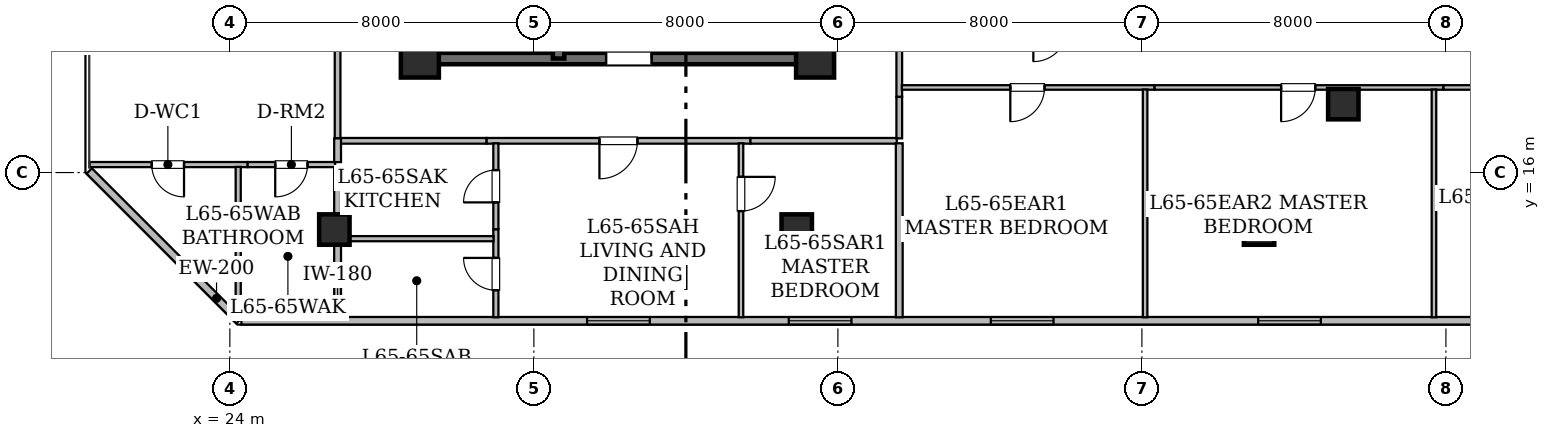
"""IFC4 building model, lengths in metres.
Left out: names, types, materials, properties, quantities, classifications, styles, units other than length and angle.
Written with IfcOpenShell. Run it as: python <this file> out.ifc"""

import sys

from ifc_helpers import new_model, si_unit, direction, frame, frame_2d, origin, origin_2d, place, context, subcontext, project, spatial, rectangle, hollow_rectangle, extrude, element, fill, save


model = new_model("IFC4")
c1 = context("Model", 3, precision=1e-05, world=origin(), true_north=direction((0.0, 1.0)))
c2 = subcontext(c1, "Body", "Model", "MODEL_VIEW")
j1 = project(units=[si_unit("LENGTHUNIT", "METRE"), si_unit("PLANEANGLEUNIT", "RADIAN")], contexts=[c1])
p1 = place(None, origin())
s1 = spatial("IfcSite", under=j1, at=p1, CompositionType="ELEMENT")
p2 = place(p1, origin())
s2 = spatial("IfcBuilding", under=s1, at=p2, CompositionType="ELEMENT")
p3 = place(p2, frame((0.0, 0.0, 253.7)))
s3 = spatial("IfcBuildingStorey", under=s2, at=p3, CompositionType="ELEMENT", Elevation=253.7)
for number, where, z_axis, x_axis in (
    (1, (29.0, 19.0, 0.0), (0.0, 0.0, 1.0), (1.0, 0.0, 0.0)),
    (2, (39.4, 19.0, 0.0), (0.0, 0.0, 1.0), (1.0, 0.0, 0.0)),
):
    element("IfcColumn", number, at=place(p3, frame(where, z_axis=z_axis, x_axis=x_axis)), inside=s3, PredefinedType="COLUMN", context=c2, shape_type="SweptSolid", body=[
        extrude(hollow_rectangle(XDim=1.0, YDim=1.0, WallThickness=0.05, at=origin_2d()), origin(), (0.0, 0.0, 1.0), 3.65),
    ])
for number, where, z_axis, x_axis in (
    (3, (26.75, 14.5, 0.0), (0.0, 0.0, 1.0), (1.0, 0.0, 0.0)),
    (4, (38.917, 14.5, 0.0), (0.0, 0.0, 1.0), (1.0, 0.0, 0.0)),
    (5, (51.083, 14.5, 0.0), (0.0, 0.0, 1.0), (1.0, 0.0, 0.0)),
    (6, (53.3, 17.8, 0.0), (0.0, 0.0, 1.0), (1.0, 0.0, 0.0)),
):
    element("IfcColumn", number, at=place(p3, frame(where, z_axis=z_axis, x_axis=x_axis)), inside=s3, PredefinedType="COLUMN", context=c2, shape_type="SweptSolid", body=[
        extrude(hollow_rectangle(XDim=0.8, YDim=0.8, WallThickness=0.04, at=origin_2d()), origin(), (0.0, 0.0, 1.0), 3.65),
    ])
p4 = place(p3, frame((24.241, 12.1, 0.0), z_axis=(0.0, 0.0, 1.0), x_axis=(-0.707106781187, 0.707106781187, 0.0)))
e7 = element("IfcWall", 7, at=p4, inside=s3, PredefinedType="STANDARD", context=c2, shape_type="SweptSolid", body=[
    extrude(rectangle(XDim=5.573, YDim=0.2, at=frame_2d((2.787, 0.0))), origin(), (0.0, 0.0, 1.0), 3.43),
])
p5 = place(p3, frame((65.696, 12.1, 0.0), z_axis=(0.0, 0.0, 1.0), x_axis=(-1.0, 0.0, 0.0)))
e8 = element("IfcWall", 8, at=p5, inside=s3, PredefinedType="STANDARD", context=c2, shape_type="SweptSolid", body=[
    extrude(rectangle(XDim=41.393, YDim=0.2, at=frame_2d((20.697, 0.0))), origin(), (0.0, 0.0, 1.0), 3.43),
])
p6 = place(p5, frame((30.646, 0.0, 0.85)))
e9 = element("IfcOpeningElement", 9, at=p6, cuts=e8, PredefinedType="OPENING", context=c2, shape_type="SweptSolid", body=[
    extrude(rectangle(XDim=1.65, YDim=1.55, at=frame_2d((0.825, 0.775))), frame((0.0, 0.11, 0.0), z_axis=(0.0, -1.0, 0.0), x_axis=(1.0, 0.0, 0.0)), (0.0, 0.0, 1.0), 0.22),
])
p7 = place(p5, frame((25.339, 0.0, 0.85)))
e10 = element("IfcOpeningElement", 10, at=p7, cuts=e8, PredefinedType="OPENING", context=c2, shape_type="SweptSolid", body=[
    extrude(rectangle(XDim=1.65, YDim=1.55, at=frame_2d((0.825, 0.775))), frame((0.0, 0.11, 0.0), z_axis=(0.0, -1.0, 0.0), x_axis=(1.0, 0.0, 0.0)), (0.0, 0.0, 1.0), 0.22),
])
p8 = place(p5, frame((20.022, 0.0, 0.85)))
e11 = element("IfcOpeningElement", 11, at=p8, cuts=e8, PredefinedType="OPENING", context=c2, shape_type="SweptSolid", body=[
    extrude(rectangle(XDim=1.65, YDim=1.55, at=frame_2d((0.825, 0.775))), frame((0.0, 0.11, 0.0), z_axis=(0.0, -1.0, 0.0), x_axis=(1.0, 0.0, 0.0)), (0.0, 0.0, 1.0), 0.22),
])
p9 = place(p5, frame((12.987, 0.0, 0.85)))
e12 = element("IfcOpeningElement", 12, at=p9, cuts=e8, PredefinedType="OPENING", context=c2, shape_type="SweptSolid", body=[
    extrude(rectangle(XDim=1.65, YDim=1.55, at=frame_2d((0.825, 0.775))), frame((0.0, 0.11, 0.0), z_axis=(0.0, -1.0, 0.0), x_axis=(1.0, 0.0, 0.0)), (0.0, 0.0, 1.0), 0.22),
])
p10 = place(p5, frame((4.787, 0.0, 0.85)))
e13 = element("IfcOpeningElement", 13, at=p10, cuts=e8, PredefinedType="OPENING", context=c2, shape_type="SweptSolid", body=[
    extrude(rectangle(XDim=1.65, YDim=1.55, at=frame_2d((0.825, 0.775))), frame((0.0, 0.11, 0.0), z_axis=(0.0, -1.0, 0.0), x_axis=(1.0, 0.0, 0.0)), (0.0, 0.0, 1.0), 0.22),
])
p11 = place(p3, frame((29.0, 19.0, 0.0), z_axis=(0.0, 0.0, 1.0), x_axis=(0.0, 1.0, 0.0)))
e14 = element("IfcWall", 14, at=p11, inside=s3, PredefinedType="SHEAR", context=c2, shape_type="SweptSolid", body=[
    extrude(rectangle(XDim=9.0, YDim=0.3, at=frame_2d((4.5, 0.0))), origin(), (0.0, 0.0, 1.0), 3.43),
])
p12 = place(p3, frame((29.0, 19.0, 0.0), z_axis=(0.0, 0.0, 1.0), x_axis=(1.0, 0.0, 0.0)))
e15 = element("IfcWall", 15, at=p12, inside=s3, PredefinedType="SHEAR", context=c2, shape_type="SweptSolid", body=[
    extrude(rectangle(XDim=10.4, YDim=0.3, at=frame_2d((5.2, 0.0))), origin(), (0.0, 0.0, 1.0), 3.43),
])
p13 = place(p12, frame((4.9, 0.0, 0.0)))
e16 = element("IfcOpeningElement", 16, at=p13, cuts=e15, PredefinedType="OPENING", context=c2, shape_type="SweptSolid", body=[
    extrude(rectangle(XDim=1.2, YDim=2.15, at=frame_2d((0.6, 1.075))), frame((0.0, 0.16, 0.0), z_axis=(0.0, -1.0, 0.0), x_axis=(1.0, 0.0, 0.0)), (0.0, 0.0, 1.0), 0.32),
])
p14 = place(p3, frame((39.4, 19.0, 0.0), z_axis=(0.0, 0.0, 1.0), x_axis=(0.0, 1.0, 0.0)))
e17 = element("IfcWall", 17, at=p14, inside=s3, PredefinedType="SHEAR", context=c2, shape_type="SweptSolid", body=[
    extrude(rectangle(XDim=5.4, YDim=0.3, at=frame_2d((2.7, 0.0))), origin(), (0.0, 0.0, 1.0), 3.43),
])
p15 = place(p3, frame((32.65, 19.0, 0.0), z_axis=(0.0, 0.0, 1.0), x_axis=(0.0, 1.0, 0.0)))
e18 = element("IfcWall", 18, at=p15, inside=s3, PredefinedType="SHEAR", context=c2, shape_type="SweptSolid", body=[
    extrude(rectangle(XDim=9.0, YDim=0.3, at=frame_2d((4.5, 0.0))), origin(), (0.0, 0.0, 1.0), 3.43),
])
p16 = place(p15, frame((0.72, 0.0, 0.0)))
e19 = element("IfcOpeningElement", 19, at=p16, cuts=e18, PredefinedType="OPENING", context=c2, shape_type="SweptSolid", body=[
    extrude(rectangle(XDim=1.0, YDim=2.15, at=frame_2d((0.5, 1.075))), frame((0.0, 0.16, 0.0), z_axis=(0.0, -1.0, 0.0), x_axis=(1.0, 0.0, 0.0)), (0.0, 0.0, 1.0), 0.32),
])
p17 = place(p3, frame((36.45, 19.154, 0.0), z_axis=(0.0, 0.0, 1.0), x_axis=(0.0, 1.0, 0.0)))
e20 = element("IfcWall", 20, at=p17, inside=s3, PredefinedType="SHEAR", context=c2, shape_type="SweptSolid", body=[
    extrude(rectangle(XDim=4.746, YDim=0.3, at=frame_2d((2.373, 0.0))), origin(), (0.0, 0.0, 1.0), 3.43),
])
p18 = place(p17, frame((0.696, 0.0, 0.0)))
e21 = element("IfcOpeningElement", 21, at=p18, cuts=e20, PredefinedType="OPENING", context=c2, shape_type="SweptSolid", body=[
    extrude(rectangle(XDim=1.1, YDim=2.15, at=frame_2d((0.55, 1.075))), frame((0.0, 0.16, 0.0), z_axis=(0.0, -1.0, 0.0), x_axis=(1.0, 0.0, 0.0)), (0.0, 0.0, 1.0), 0.32),
])
p19 = place(p17, frame((3.316, 0.0, 0.0)))
e22 = element("IfcOpeningElement", 22, at=p19, cuts=e20, PredefinedType="OPENING", context=c2, shape_type="SweptSolid", body=[
    extrude(rectangle(XDim=1.1, YDim=2.15, at=frame_2d((0.55, 1.075))), frame((0.0, 0.16, 0.0), z_axis=(0.0, -1.0, 0.0), x_axis=(1.0, 0.0, 0.0)), (0.0, 0.0, 1.0), 0.32),
])
p20 = place(p3, frame((26.835, 16.9, 0.0), z_axis=(0.0, 0.0, 1.0), x_axis=(0.0, 1.0, 0.0)))
e23 = element("IfcWall", 23, at=p20, inside=s3, PredefinedType="STANDARD", context=c2, shape_type="SweptSolid", body=[
    extrude(rectangle(XDim=8.159, YDim=0.15, at=frame_2d((4.08, 0.0))), origin(), (0.0, 0.0, 1.0), 2.725),
])
p21 = place(p20, frame((3.559, 0.0, 0.0)))
e24 = element("IfcOpeningElement", 24, at=p21, cuts=e23, PredefinedType="OPENING", context=c2, shape_type="SweptSolid", body=[
    extrude(rectangle(XDim=1.0, YDim=2.15, at=frame_2d((0.5, 1.075))), frame((0.0, 0.085, 0.0), z_axis=(0.0, -1.0, 0.0), x_axis=(1.0, 0.0, 0.0)), (0.0, 0.0, 1.0), 0.17),
])
p22 = place(p3, frame((37.699, 16.835, 0.0), z_axis=(0.0, 0.0, 1.0), x_axis=(-1.0, 0.0, 0.0)))
e25 = element("IfcWall", 25, at=p22, inside=s3, PredefinedType="STANDARD", context=c2, shape_type="SweptSolid", body=[
    extrude(rectangle(XDim=6.948, YDim=0.15, at=frame_2d((3.474, 0.0))), origin(), (0.0, 0.0, 1.0), 3.43),
])
p23 = place(p22, frame((2.974, 0.0, 0.0)))
e26 = element("IfcOpeningElement", 26, at=p23, cuts=e25, PredefinedType="OPENING", context=c2, shape_type="SweptSolid", body=[
    extrude(rectangle(XDim=1.0, YDim=2.15, at=frame_2d((0.5, 1.075))), frame((0.0, 0.085, 0.0), z_axis=(0.0, -1.0, 0.0), x_axis=(1.0, 0.0, 0.0)), (0.0, 0.0, 1.0), 0.17),
])
for number, where, z_axis, x_axis in (
    (27, (30.751, 16.835, 0.0), (0.0, 0.0, 1.0), (-1.0, 0.0, 0.0)),
    (28, (41.55, 16.835, 0.0), (0.0, 0.0, 1.0), (-1.0, 0.0, 0.0)),
):
    element("IfcWall", number, at=place(p3, frame(where, z_axis=z_axis, x_axis=x_axis)), inside=s3, PredefinedType="STANDARD", context=c2, shape_type="SweptSolid", body=[
        extrude(rectangle(XDim=3.851, YDim=0.15, at=frame_2d((1.926, 0.0))), origin(), (0.0, 0.0, 1.0), 2.725),
    ])
p24 = place(p3, frame((41.615, 19.57, 0.0), z_axis=(0.0, 0.0, 1.0), x_axis=(0.0, -1.0, 0.0)))
e29 = element("IfcWall", 29, at=p24, inside=s3, PredefinedType="STANDARD", context=c2, shape_type="SweptSolid", body=[
    extrude(rectangle(XDim=1.58, YDim=0.15, at=frame_2d((0.79, 0.0))), origin(), (0.0, 0.0, 1.0), 2.725),
])
p25 = place(p3, frame((41.615, 17.99, 0.0), z_axis=(0.0, 0.0, 1.0), x_axis=(0.0, -1.0, 0.0)))
e30 = element("IfcWall", 30, at=p25, inside=s3, PredefinedType="STANDARD", context=c2, shape_type="SweptSolid", body=[
    extrude(rectangle(XDim=1.09, YDim=0.15, at=frame_2d((0.545, 0.0))), origin(), (0.0, 0.0, 1.0), 2.725),
])
p26 = place(p3, frame((24.469, 16.21, 0.0), z_axis=(0.0, 0.0, 1.0), x_axis=(-1.0, 0.0, 0.0)))
e31 = element("IfcWall", 31, at=p26, inside=s3, PredefinedType="PARTITIONING", context=c2, shape_type="SweptSolid", body=[
    extrude(rectangle(XDim=4.159, YDim=0.135, at=frame_2d((2.08, 0.0))), origin(), (0.0, 0.0, 1.0), 3.43),
])
p27 = place(p26, frame((1.675, 0.0, 0.0)))
e32 = element("IfcOpeningElement", 32, at=p27, cuts=e31, PredefinedType="OPENING", context=c2, shape_type="SweptSolid", body=[
    extrude(rectangle(XDim=0.85, YDim=2.1, at=frame_2d((0.425, 1.05))), frame((0.0, 0.077, 0.0), z_axis=(0.0, -1.0, 0.0), x_axis=(1.0, 0.0, 0.0)), (0.0, 0.0, 1.0), 0.155),
])
p28 = place(p3, frame((26.77, 16.21, 0.0), z_axis=(0.0, 0.0, 1.0), x_axis=(-1.0, 0.0, 0.0)))
e33 = element("IfcWall", 33, at=p28, inside=s3, PredefinedType="PARTITIONING", context=c2, shape_type="SweptSolid", body=[
    extrude(rectangle(XDim=2.301, YDim=0.135, at=frame_2d((1.15, 0.0))), origin(), (0.0, 0.0, 1.0), 2.887),
])
p29 = place(p28, frame((0.726, 0.0, 0.0)))
e34 = element("IfcOpeningElement", 34, at=p29, cuts=e33, PredefinedType="OPENING", context=c2, shape_type="SweptSolid", body=[
    extrude(rectangle(XDim=0.85, YDim=2.1, at=frame_2d((0.425, 1.05))), frame((0.0, 0.077, 0.0), z_axis=(0.0, -1.0, 0.0), x_axis=(1.0, 0.0, 0.0)), (0.0, 0.0, 1.0), 0.155),
])
p30 = place(p3, frame((26.835, 16.9, 0.0), z_axis=(0.0, 0.0, 1.0), x_axis=(0.0, -1.0, 0.0)))
e35 = element("IfcWall", 35, at=p30, inside=s3, PredefinedType="STANDARD", context=c2, shape_type="SweptSolid", body=[
    extrude(rectangle(XDim=0.625, YDim=0.18, at=frame_2d((0.312, 0.0))), origin(), (0.0, 0.0, 1.0), 3.43),
])
p31 = place(p3, frame((24.22, 16.149, 0.0), z_axis=(0.0, 0.0, 1.0), x_axis=(0.0, -1.0, 0.0)))
e36 = element("IfcWall", 36, at=p31, inside=s3, PredefinedType="PARTITIONING", context=c2, shape_type="SweptSolid", body=[
    extrude(rectangle(XDim=3.913, YDim=0.135, at=frame_2d((1.957, 0.0))), origin(), (0.0, 0.0, 1.0), 3.43),
])
p32 = place(p3, frame((26.835, 14.509, 0.0), z_axis=(0.0, 0.0, 1.0), x_axis=(0.0, -1.0, 0.0)))
e37 = element("IfcWall", 37, at=p32, inside=s3, PredefinedType="STANDARD", context=c2, shape_type="SweptSolid", body=[
    extrude(rectangle(XDim=2.317, YDim=0.18, at=frame_2d((1.159, 0.0))), origin(), (0.0, 0.0, 1.0), 2.725),
])
p33 = place(p3, frame((26.835, 16.145, 0.0), z_axis=(0.0, 0.0, 1.0), x_axis=(0.0, -1.0, 0.0)))
e38 = element("IfcWall", 38, at=p33, inside=s3, PredefinedType="STANDARD", context=c2, shape_type="SweptSolid", body=[
    extrude(rectangle(XDim=1.636, YDim=0.18, at=frame_2d((0.818, 0.0))), origin(), (0.0, 0.0, 1.0), 2.725),
])
p34 = place(p3, frame((31.0, 12.192, 0.0), z_axis=(0.0, 0.0, 1.0), x_axis=(0.0, 1.0, 0.0)))
e39 = element("IfcWall", 39, at=p34, inside=s3, PredefinedType="PARTITIONING", context=c2, shape_type="SweptSolid", body=[
    extrude(rectangle(XDim=2.317, YDim=0.135, at=frame_2d((1.159, 0.0))), origin(), (0.0, 0.0, 1.0), 2.887),
])
p35 = place(p34, frame((0.712, 0.0, 0.0)))
e40 = element("IfcOpeningElement", 40, at=p35, cuts=e39, PredefinedType="OPENING", context=c2, shape_type="SweptSolid", body=[
    extrude(rectangle(XDim=0.85, YDim=2.1, at=frame_2d((0.425, 1.05))), frame((0.0, 0.077, 0.0), z_axis=(0.0, -1.0, 0.0), x_axis=(1.0, 0.0, 0.0)), (0.0, 0.0, 1.0), 0.155),
])
p36 = place(p3, frame((31.0, 14.509, 0.0), z_axis=(0.0, 0.0, 1.0), x_axis=(0.0, 1.0, 0.0)))
e41 = element("IfcWall", 41, at=p36, inside=s3, PredefinedType="PARTITIONING", context=c2, shape_type="SweptSolid", body=[
    extrude(rectangle(XDim=2.261, YDim=0.135, at=frame_2d((1.13, 0.0))), origin(), (0.0, 0.0, 1.0), 2.887),
])
p37 = place(p36, frame((0.706, 0.0, 0.0)))
e42 = element("IfcOpeningElement", 42, at=p37, cuts=e41, PredefinedType="OPENING", context=c2, shape_type="SweptSolid", body=[
    extrude(rectangle(XDim=0.85, YDim=2.1, at=frame_2d((0.425, 1.05))), frame((0.0, 0.077, 0.0), z_axis=(0.0, -1.0, 0.0), x_axis=(1.0, 0.0, 0.0)), (0.0, 0.0, 1.0), 0.155),
])
p38 = place(p3, frame((37.45, 16.77, 0.0), z_axis=(0.0, 0.0, 1.0), x_axis=(0.0, -1.0, 0.0)))
e43 = element("IfcWall", 43, at=p38, inside=s3, PredefinedType="PARTITIONING", context=c2, shape_type="SweptSolid", body=[
    extrude(rectangle(XDim=4.578, YDim=0.12, at=frame_2d((2.289, 0.0))), origin(), (0.0, 0.0, 1.0), 2.887),
])
p39 = place(p38, frame((0.884, 0.0, 0.0)))
e44 = element("IfcOpeningElement", 44, at=p39, cuts=e43, PredefinedType="OPENING", context=c2, shape_type="SweptSolid", body=[
    extrude(rectangle(XDim=0.9, YDim=2.1, at=frame_2d((0.45, 1.05))), frame((0.0, 0.07, 0.0), z_axis=(0.0, -1.0, 0.0), x_axis=(1.0, 0.0, 0.0)), (0.0, 0.0, 1.0), 0.14),
])
p40 = place(p3, frame((26.917, 14.26, 0.0), z_axis=(0.0, 0.0, 1.0), x_axis=(1.0, 0.0, 0.0)))
e45 = element("IfcWall", 45, at=p40, inside=s3, PredefinedType="PARTITIONING", context=c2, shape_type="SweptSolid", body=[
    extrude(rectangle(XDim=4.022, YDim=0.135, at=frame_2d((2.011, 0.0))), origin(), (0.0, 0.0, 1.0), 2.887),
])
p41 = place(p3, frame((41.615, 16.77, 0.0), z_axis=(0.0, 0.0, 1.0), x_axis=(0.0, -1.0, 0.0)))
e46 = element("IfcWall", 46, at=p41, inside=s3, PredefinedType="STANDARD", context=c2, shape_type="SweptSolid", body=[
    extrude(rectangle(XDim=4.578, YDim=0.18, at=frame_2d((2.289, 0.0))), origin(), (0.0, 0.0, 1.0), 2.887),
])
p42 = place(p3, frame((48.333, 18.239, 0.0), z_axis=(0.0, 0.0, 1.0), x_axis=(-1.0, 0.0, 0.0)))
e47 = element("IfcWall", 47, at=p42, inside=s3, PredefinedType="PARTITIONING", context=c2, shape_type="SweptSolid", body=[
    extrude(rectangle(XDim=6.651, YDim=0.12, at=frame_2d((3.326, 0.0))), origin(), (0.0, 0.0, 1.0), 2.725),
])
p43 = place(p42, frame((2.896, 0.0, 0.0)))
e48 = element("IfcOpeningElement", 48, at=p43, cuts=e47, PredefinedType="OPENING", context=c2, shape_type="SweptSolid", body=[
    extrude(rectangle(XDim=0.9, YDim=2.1, at=frame_2d((0.45, 1.05))), frame((0.0, 0.07, 0.0), z_axis=(0.0, -1.0, 0.0), x_axis=(1.0, 0.0, 0.0)), (0.0, 0.0, 1.0), 0.14),
])
p44 = place(p3, frame((55.934, 18.239, 0.0), z_axis=(0.0, 0.0, 1.0), x_axis=(-1.0, 0.0, 0.0)))
e49 = element("IfcWall", 49, at=p44, inside=s3, PredefinedType="PARTITIONING", context=c2, shape_type="SweptSolid", body=[
    extrude(rectangle(XDim=7.601, YDim=0.12, at=frame_2d((3.801, 0.0))), origin(), (0.0, 0.0, 1.0), 2.725),
])
p45 = place(p44, frame((3.371, 0.0, 0.0)))
e50 = element("IfcOpeningElement", 50, at=p45, cuts=e49, PredefinedType="OPENING", context=c2, shape_type="SweptSolid", body=[
    extrude(rectangle(XDim=0.9, YDim=2.1, at=frame_2d((0.45, 1.05))), frame((0.0, 0.07, 0.0), z_axis=(0.0, -1.0, 0.0), x_axis=(1.0, 0.0, 0.0)), (0.0, 0.0, 1.0), 0.14),
])
p46 = place(p3, frame((64.733, 18.239, 0.0), z_axis=(0.0, 0.0, 1.0), x_axis=(-1.0, 0.0, 0.0)))
e51 = element("IfcWall", 51, at=p46, inside=s3, PredefinedType="PARTITIONING", context=c2, shape_type="SweptSolid", body=[
    extrude(rectangle(XDim=8.799, YDim=0.12, at=frame_2d((4.399, 0.0))), origin(), (0.0, 0.0, 1.0), 2.725),
])
p47 = place(p46, frame((3.97, 0.0, 0.0)))
e52 = element("IfcOpeningElement", 52, at=p47, cuts=e51, PredefinedType="OPENING", context=c2, shape_type="SweptSolid", body=[
    extrude(rectangle(XDim=0.9, YDim=2.1, at=frame_2d((0.45, 1.05))), frame((0.0, 0.07, 0.0), z_axis=(0.0, -1.0, 0.0), x_axis=(1.0, 0.0, 0.0)), (0.0, 0.0, 1.0), 0.14),
])
for number, where, z_axis, x_axis in (
    (53, (48.084, 18.185, 0.0), (0.0, 0.0, 1.0), (0.0, -1.0, 0.0)),
    (54, (55.685, 18.185, 0.0), (0.0, 0.0, 1.0), (0.0, -1.0, 0.0)),
):
    element("IfcWall", number, at=place(p3, frame(where, z_axis=z_axis, x_axis=x_axis)), inside=s3, PredefinedType="PARTITIONING", context=c2, shape_type="SweptSolid", body=[
        extrude(rectangle(XDim=5.993, YDim=0.12, at=frame_2d((2.997, 0.0))), origin(), (0.0, 0.0, 1.0), 2.725),
    ])
p48 = place(p6, origin())
e55 = element("IfcWindow", 55, at=p48, inside=s3, PartitioningType="SINGLE_PANEL", PredefinedType="WINDOW", context=c2, shape_type="SweptSolid", body=[
    extrude(rectangle(XDim=1.65, YDim=1.55, at=frame_2d((0.825, 0.775))), frame((0.0, 0.03, 0.0), z_axis=(0.0, -1.0, 0.0), x_axis=(1.0, 0.0, 0.0)), (0.0, 0.0, 1.0), 0.06),
])
fill(e9, e55)
p49 = place(p7, origin())
e56 = element("IfcWindow", 56, at=p49, inside=s3, PartitioningType="SINGLE_PANEL", PredefinedType="WINDOW", context=c2, shape_type="SweptSolid", body=[
    extrude(rectangle(XDim=1.65, YDim=1.55, at=frame_2d((0.825, 0.775))), frame((0.0, 0.03, 0.0), z_axis=(0.0, -1.0, 0.0), x_axis=(1.0, 0.0, 0.0)), (0.0, 0.0, 1.0), 0.06),
])
fill(e10, e56)
p50 = place(p8, origin())
e57 = element("IfcWindow", 57, at=p50, inside=s3, PartitioningType="SINGLE_PANEL", PredefinedType="WINDOW", context=c2, shape_type="SweptSolid", body=[
    extrude(rectangle(XDim=1.65, YDim=1.55, at=frame_2d((0.825, 0.775))), frame((0.0, 0.03, 0.0), z_axis=(0.0, -1.0, 0.0), x_axis=(1.0, 0.0, 0.0)), (0.0, 0.0, 1.0), 0.06),
])
fill(e11, e57)
p51 = place(p9, origin())
e58 = element("IfcWindow", 58, at=p51, inside=s3, PartitioningType="SINGLE_PANEL", PredefinedType="WINDOW", context=c2, shape_type="SweptSolid", body=[
    extrude(rectangle(XDim=1.65, YDim=1.55, at=frame_2d((0.825, 0.775))), frame((0.0, 0.03, 0.0), z_axis=(0.0, -1.0, 0.0), x_axis=(1.0, 0.0, 0.0)), (0.0, 0.0, 1.0), 0.06),
])
fill(e12, e58)
p52 = place(p13, origin())
e59 = element("IfcDoor", 59, at=p52, inside=s3, OperationType="SINGLE_SWING_RIGHT", PredefinedType="DOOR", context=c2, shape_type="SweptSolid", body=[
    extrude(rectangle(XDim=1.2, YDim=2.15, at=frame_2d((0.6, 1.075))), frame((0.0, 0.025, 0.0), z_axis=(0.0, -1.0, 0.0), x_axis=(1.0, 0.0, 0.0)), (0.0, 0.0, 1.0), 0.05),
])
fill(e16, e59)
p53 = place(p23, origin())
e60 = element("IfcDoor", 60, at=p53, inside=s3, OperationType="SINGLE_SWING_RIGHT", PredefinedType="DOOR", context=c2, shape_type="SweptSolid", body=[
    extrude(rectangle(XDim=1.0, YDim=2.15, at=frame_2d((0.5, 1.075))), frame((0.0, 0.025, 0.0), z_axis=(0.0, -1.0, 0.0), x_axis=(1.0, 0.0, 0.0)), (0.0, 0.0, 1.0), 0.05),
])
fill(e26, e60)
p54 = place(p27, origin())
e61 = element("IfcDoor", 61, at=p54, inside=s3, OperationType="SINGLE_SWING_LEFT", PredefinedType="DOOR", context=c2, shape_type="SweptSolid", body=[
    extrude(rectangle(XDim=0.85, YDim=2.1, at=frame_2d((0.425, 1.05))), frame((0.0, 0.025, 0.0), z_axis=(0.0, -1.0, 0.0), x_axis=(1.0, 0.0, 0.0)), (0.0, 0.0, 1.0), 0.05),
])
fill(e32, e61)
p55 = place(p29, origin())
e62 = element("IfcDoor", 62, at=p55, inside=s3, OperationType="SINGLE_SWING_RIGHT", PredefinedType="DOOR", context=c2, shape_type="SweptSolid", body=[
    extrude(rectangle(XDim=0.85, YDim=2.1, at=frame_2d((0.425, 1.05))), frame((0.0, 0.025, 0.0), z_axis=(0.0, -1.0, 0.0), x_axis=(1.0, 0.0, 0.0)), (0.0, 0.0, 1.0), 0.05),
])
fill(e34, e62)
p56 = place(p35, origin())
e63 = element("IfcDoor", 63, at=p56, inside=s3, OperationType="SINGLE_SWING_RIGHT", PredefinedType="DOOR", context=c2, shape_type="SweptSolid", body=[
    extrude(rectangle(XDim=0.85, YDim=2.1, at=frame_2d((0.425, 1.05))), frame((0.0, 0.025, 0.0), z_axis=(0.0, -1.0, 0.0), x_axis=(1.0, 0.0, 0.0)), (0.0, 0.0, 1.0), 0.05),
])
fill(e40, e63)
p57 = place(p37, origin())
e64 = element("IfcDoor", 64, at=p57, inside=s3, OperationType="SINGLE_SWING_LEFT", PredefinedType="DOOR", context=c2, shape_type="SweptSolid", body=[
    extrude(rectangle(XDim=0.85, YDim=2.1, at=frame_2d((0.425, 1.05))), frame((0.0, 0.025, 0.0), z_axis=(0.0, -1.0, 0.0), x_axis=(1.0, 0.0, 0.0)), (0.0, 0.0, 1.0), 0.05),
])
fill(e42, e64)
p58 = place(p39, origin())
e65 = element("IfcDoor", 65, at=p58, inside=s3, OperationType="SINGLE_SWING_LEFT", PredefinedType="DOOR", context=c2, shape_type="SweptSolid", body=[
    extrude(rectangle(XDim=0.9, YDim=2.1, at=frame_2d((0.45, 1.05))), frame((0.0, 0.025, 0.0), z_axis=(0.0, -1.0, 0.0), x_axis=(1.0, 0.0, 0.0)), (0.0, 0.0, 1.0), 0.05),
])
fill(e44, e65)
p59 = place(p43, origin())
e66 = element("IfcDoor", 66, at=p59, inside=s3, OperationType="SINGLE_SWING_RIGHT", PredefinedType="DOOR", context=c2, shape_type="SweptSolid", body=[
    extrude(rectangle(XDim=0.9, YDim=2.1, at=frame_2d((0.45, 1.05))), frame((0.0, 0.025, 0.0), z_axis=(0.0, -1.0, 0.0), x_axis=(1.0, 0.0, 0.0)), (0.0, 0.0, 1.0), 0.05),
])
fill(e48, e66)
p60 = place(p45, origin())
e67 = element("IfcDoor", 67, at=p60, inside=s3, OperationType="SINGLE_SWING_RIGHT", PredefinedType="DOOR", context=c2, shape_type="SweptSolid", body=[
    extrude(rectangle(XDim=0.9, YDim=2.1, at=frame_2d((0.45, 1.05))), frame((0.0, 0.025, 0.0), z_axis=(0.0, -1.0, 0.0), x_axis=(1.0, 0.0, 0.0)), (0.0, 0.0, 1.0), 0.05),
])
fill(e50, e67)
save(model, sys.argv[1])
